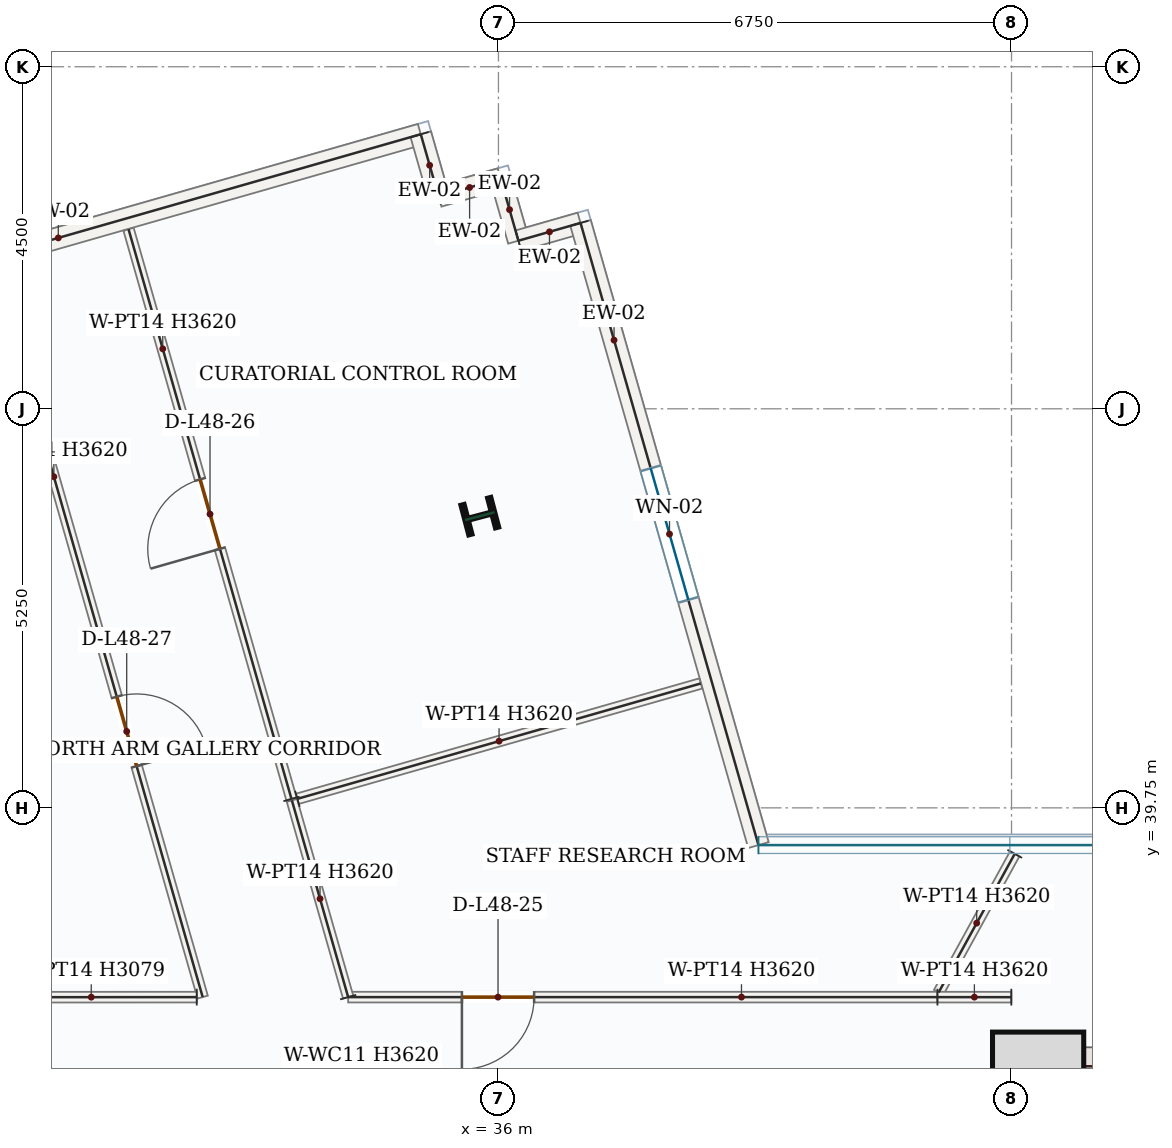
"""IFC4 building model, lengths in metres.
Left out: names, types, materials, properties, quantities, classifications, styles, units other than length and angle.
Written with IfcOpenShell. Run it as: python <this file> out.ifc"""

import sys

from ifc_helpers import new_model, si_unit, direction, frame, frame_2d, origin, origin_2d, place, context, subcontext, project, spatial, rectangle, i_section, extrude, source, transform, mapped, element, fill, save


model = new_model("IFC4")
c1 = context("Model", 3, precision=1e-05, world=origin(), true_north=direction((0.0, 1.0)))
c2 = subcontext(c1, "Body", "Model", "MODEL_VIEW")
j1 = project(units=[si_unit("LENGTHUNIT", "METRE"), si_unit("PLANEANGLEUNIT", "RADIAN")], contexts=[c1])
p1 = place(None, origin())
s1 = spatial("IfcSite", under=j1, at=p1, CompositionType="ELEMENT")
p2 = place(p1, origin())
s2 = spatial("IfcBuilding", under=s1, at=p2, CompositionType="ELEMENT")
p3 = place(p2, frame((0.0, 0.0, 205.8)))
s3 = spatial("IfcBuildingStorey", under=s2, at=p3, CompositionType="ELEMENT", Elevation=205.8)
p4 = place(p3, frame((43.0, 28.05, 0.0), z_axis=(0.0, 0.0, 1.0), x_axis=(0.0, 1.0, 0.0)))
e1 = element("IfcWall", 1, at=p4, inside=s3, PredefinedType="SHEAR", context=c2, shape_type="SweptSolid", body=[
    extrude(rectangle(XDim=8.55, YDim=0.5, at=frame_2d((4.275, 0.0))), origin(), (0.0, 0.0, 1.0), 3.62),
])
p5 = place(p4, frame((1.5, 0.0, 0.0)))
e2 = element("IfcOpeningElement", 2, at=p5, cuts=e1, PredefinedType="OPENING", context=c2, shape_type="SweptSolid", body=[
    extrude(rectangle(XDim=1.1, YDim=2.2, at=frame_2d((0.55, 1.1))), frame((0.0, 0.26, 0.0), z_axis=(0.0, -1.0, 0.0), x_axis=(1.0, 0.0, 0.0)), (0.0, 0.0, 1.0), 0.52),
])
m1 = source(origin(), c2, "Body", "SweptSolid", [
    extrude(rectangle(XDim=7.0, YDim=0.5, at=frame_2d((3.5, 0.0))), origin(), (0.0, 0.0, 1.0), 3.62),
])
p6 = place(p3, frame((43.25, 36.35, 0.0), z_axis=(0.0, 0.0, 1.0), x_axis=(1.0, 0.0, 0.0)))
e3 = element("IfcWall", 3, at=p6, inside=s3, PredefinedType="SHEAR", context=c2, shape_type="MappedRepresentation", body=[
    mapped(m1, transform((0.0, 0.0, 0.0), x_axis=(1.0, 0.0, 0.0), y_axis=(0.0, 1.0, 0.0), z_axis=(0.0, 0.0, 1.0), scale=1.0)),
])
m2 = source(origin(), c2, "Body", "SweptSolid", [
    extrude(rectangle(XDim=1.2, YDim=1.2, at=origin_2d()), origin(), (0.0, 0.0, 1.0), 3.9),
])
p7 = place(p3, frame((43.1, 36.2, 0.0), z_axis=(0.0, 0.0, 1.0), x_axis=(1.0, 0.0, 0.0)))
e4 = element("IfcColumn", 4, at=p7, inside=s3, PredefinedType="COLUMN", context=c2, shape_type="MappedRepresentation", body=[
    mapped(m2, transform((0.0, 0.0, 0.0), x_axis=(1.0, 0.0, 0.0), y_axis=(0.0, 1.0, 0.0), z_axis=(0.0, 0.0, 1.0), scale=1.0)),
])
m3 = source(origin(), c2, "Body", "SweptSolid", [
    extrude(i_section(OverallWidth=0.404, OverallDepth=0.407, WebThickness=0.027, FlangeThickness=0.044, FilletRadius=0.018, at=origin_2d()), origin(), (0.0, 0.0, 1.0), 3.9),
])
p8 = place(p3, frame((35.755, 43.588, 0.0), z_axis=(0.0, 0.0, 1.0), x_axis=(-0.255445757936, 0.966823388604, 0.0)))
e5 = element("IfcColumn", 5, at=p8, inside=s3, PredefinedType="COLUMN", context=c2, shape_type="MappedRepresentation", body=[
    mapped(m3, transform((0.0, 0.0, 0.0), x_axis=(1.0, 0.0, 0.0), y_axis=(0.0, 1.0, 0.0), z_axis=(0.0, 0.0, 1.0), scale=1.0)),
])
m4 = source(origin(), c2, "Body", "SweptSolid", [
    extrude(rectangle(XDim=9.92, YDim=0.28, at=frame_2d((4.96, 0.0))), origin(), (0.0, 0.0, 1.0), 3.62),
])
p9 = place(p3, frame((25.44, 45.885, 0.0), z_axis=(0.0, 0.0, 1.0), x_axis=(0.961457051276, 0.274955157346, 0.0)))
e6 = element("IfcWall", 6, at=p9, inside=s3, PredefinedType="SOLIDWALL", context=c2, shape_type="MappedRepresentation", body=[
    mapped(m4, transform((0.0, 0.0, 0.0), x_axis=(1.0, 0.0, 0.0), y_axis=(0.0, 1.0, 0.0), z_axis=(0.0, 0.0, 1.0), scale=1.0)),
])
m5 = source(origin(), c2, "Body", "SweptSolid", [
    extrude(rectangle(XDim=0.85, YDim=0.28, at=frame_2d((0.425, 0.0))), origin(), (0.0, 0.0, 1.0), 3.62),
])
for number, where, z_axis, x_axis in (
    (7, (34.978, 48.612, 0.0), (0.0, 0.0, 1.0), (0.275, -0.961, 0.0)),
    (8, (35.212, 47.795, 0.0), (0.0, 0.0, 1.0), (0.961, 0.275, 0.0)),
):
    element("IfcWall", number, at=place(p3, frame(where, z_axis=z_axis, x_axis=x_axis)), inside=s3, PredefinedType="SOLIDWALL", context=c2, shape_type="MappedRepresentation", body=[
        mapped(m5, transform((0.0, 0.0, 0.0), x_axis=(1.0, 0.0, 0.0), y_axis=(0.0, 1.0, 0.0), z_axis=(0.0, 0.0, 1.0), scale=1.0)),
    ])
m6 = source(origin(), c2, "Body", "SweptSolid", [
    extrude(rectangle(XDim=0.85, YDim=0.28, at=frame_2d((0.425, 0.0))), origin(), (0.0, 0.0, 1.0), 3.62),
])
p10 = place(p3, frame((36.029, 48.029, 0.0), z_axis=(0.0, 0.0, 1.0), x_axis=(0.274834915789, -0.961491429532, 0.0)))
e9 = element("IfcWall", 9, at=p10, inside=s3, PredefinedType="SOLIDWALL", context=c2, shape_type="MappedRepresentation", body=[
    mapped(m6, transform((0.0, 0.0, 0.0), x_axis=(1.0, 0.0, 0.0), y_axis=(0.0, 1.0, 0.0), z_axis=(0.0, 0.0, 1.0), scale=1.0)),
])
p11 = place(p3, frame((36.263, 47.211, 0.0), z_axis=(0.0, 0.0, 1.0), x_axis=(0.961393768724, 0.275176346112, 0.0)))
e10 = element("IfcWall", 10, at=p11, inside=s3, PredefinedType="SOLIDWALL", context=c2, shape_type="MappedRepresentation", body=[
    mapped(m5, transform((0.0, 0.0, 0.0), x_axis=(1.0, 0.0, 0.0), y_axis=(0.0, 1.0, 0.0), z_axis=(0.0, 0.0, 1.0), scale=1.0)),
])
p12 = place(p3, frame((37.08, 47.445, 0.0), z_axis=(0.0, 0.0, 1.0), x_axis=(0.27496352843, -0.961454657295, 0.0)))
e11 = element("IfcWall", 11, at=p12, inside=s3, PredefinedType="SOLIDWALL", context=c2, shape_type="SweptSolid", body=[
    extrude(rectangle(XDim=8.513, YDim=0.28, at=frame_2d((4.257, 0.0))), origin(), (0.0, 0.0, 1.0), 3.62),
])
p13 = place(p12, frame((3.357, 0.0, 0.85)))
e12 = element("IfcOpeningElement", 12, at=p13, cuts=e11, PredefinedType="OPENING", context=c2, shape_type="SweptSolid", body=[
    extrude(rectangle(XDim=1.8, YDim=1.75, at=frame_2d((0.9, 0.875))), frame((0.0, 0.15, 0.0), z_axis=(0.0, -1.0, 0.0), x_axis=(1.0, 0.0, 0.0)), (0.0, 0.0, 1.0), 0.3),
])
p14 = place(p3, frame((41.775, 37.26, 0.0), z_axis=(0.0, 0.0, 1.0), x_axis=(-1.0, 0.0, 0.0)))
e13 = element("IfcWall", 13, at=p14, inside=s3, PredefinedType="PARTITIONING", context=c2, shape_type="SweptSolid", body=[
    extrude(rectangle(XDim=7.753, YDim=0.14, at=frame_2d((3.876, 0.0))), origin(), (0.0, 0.0, 1.0), 3.62),
])
p15 = place(p14, frame((5.306, 0.0, 0.0)))
e14 = element("IfcOpeningElement", 14, at=p15, cuts=e13, PredefinedType="OPENING", context=c2, shape_type="SweptSolid", body=[
    extrude(rectangle(XDim=0.95, YDim=2.15, at=frame_2d((0.475, 1.075))), frame((0.0, 0.08, 0.0), z_axis=(0.0, -1.0, 0.0), x_axis=(1.0, 0.0, 0.0)), (0.0, 0.0, 1.0), 0.16),
])
m7 = source(origin(), c2, "Body", "SweptSolid", [
    extrude(rectangle(XDim=2.692, YDim=0.14, at=frame_2d((1.346, 0.0))), origin(), (0.0, 0.0, 1.0), 3.62),
])
p16 = place(p3, frame((34.023, 37.26, 0.0), z_axis=(0.0, 0.0, 1.0), x_axis=(-0.27500862401, 0.961441759401, 0.0)))
e15 = element("IfcWall", 15, at=p16, inside=s3, PredefinedType="PARTITIONING", context=c2, shape_type="MappedRepresentation", body=[
    mapped(m7, transform((0.0, 0.0, 0.0), x_axis=(1.0, 0.0, 0.0), y_axis=(0.0, 1.0, 0.0), z_axis=(0.0, 0.0, 1.0), scale=1.0)),
])
m8 = source(origin(), c2, "Body", "SweptSolid", [
    extrude(rectangle(XDim=5.52, YDim=0.14, at=frame_2d((2.76, 0.0))), origin(), (0.0, 0.0, 1.0), 3.62),
])
p17 = place(p3, frame((33.354, 39.869, 0.0), z_axis=(0.0, 0.0, 1.0), x_axis=(0.961455490798, 0.274960613933, 0.0)))
e16 = element("IfcWall", 16, at=p17, inside=s3, PredefinedType="PARTITIONING", context=c2, shape_type="MappedRepresentation", body=[
    mapped(m8, transform((0.0, 0.0, 0.0), x_axis=(1.0, 0.0, 0.0), y_axis=(0.0, 1.0, 0.0), z_axis=(0.0, 0.0, 1.0), scale=1.0)),
])
m9 = source(origin(), c2, "Body", "SweptSolid", [
    extrude(rectangle(XDim=2.08, YDim=0.14, at=frame_2d((1.04, 0.0))), origin(), (0.0, 0.0, 1.0), 3.62),
])
p18 = place(p3, frame((42.792, 39.145, 0.0), z_axis=(0.0, 0.0, 1.0), x_axis=(-0.481301259497, -0.87655524504, 0.0)))
e17 = element("IfcWall", 17, at=p18, inside=s3, PredefinedType="PARTITIONING", context=c2, shape_type="MappedRepresentation", body=[
    mapped(m9, transform((0.0, 0.0, 0.0), x_axis=(1.0, 0.0, 0.0), y_axis=(0.0, 1.0, 0.0), z_axis=(0.0, 0.0, 1.0), scale=1.0)),
])
p19 = place(p3, frame((33.277, 39.867, 0.0), z_axis=(0.0, 0.0, 1.0), x_axis=(-0.274985856522, 0.96144827147, 0.0)))
e18 = element("IfcWall", 18, at=p19, inside=s3, PredefinedType="PARTITIONING", context=c2, shape_type="SweptSolid", body=[
    extrude(rectangle(XDim=7.795, YDim=0.14, at=frame_2d((3.897, 0.0))), origin(), (0.0, 0.0, 1.0), 3.62),
])
p20 = place(p19, frame((3.423, 0.0, 0.0)))
e19 = element("IfcOpeningElement", 19, at=p20, cuts=e18, PredefinedType="OPENING", context=c2, shape_type="SweptSolid", body=[
    extrude(rectangle(XDim=0.95, YDim=2.15, at=frame_2d((0.475, 1.075))), frame((0.0, 0.08, 0.0), z_axis=(0.0, -1.0, 0.0), x_axis=(1.0, 0.0, 0.0)), (0.0, 0.0, 1.0), 0.16),
])
m10 = source(origin(), c2, "Body", "SweptSolid", [
    extrude(rectangle(XDim=0.972, YDim=0.14, at=frame_2d((0.486, 0.0))), origin(), (0.0, 0.0, 1.0), 3.62),
])
p21 = place(p3, frame((42.748, 37.259, 0.0), z_axis=(0.0, 0.0, 1.0), x_axis=(-0.999999716202, 0.000753390042, 0.0)))
e20 = element("IfcWall", 20, at=p21, inside=s3, PredefinedType="PARTITIONING", context=c2, shape_type="MappedRepresentation", body=[
    mapped(m10, transform((0.0, 0.0, 0.0), x_axis=(1.0, 0.0, 0.0), y_axis=(0.0, 1.0, 0.0), z_axis=(0.0, 0.0, 1.0), scale=1.0)),
])
p22 = place(p3, frame((29.365, 46.856, 0.0), z_axis=(0.0, 0.0, 1.0), x_axis=(0.274969885882, -0.961452839123, 0.0)))
e21 = element("IfcWall", 21, at=p22, inside=s3, PredefinedType="PARTITIONING", context=c2, shape_type="SweptSolid", body=[
    extrude(rectangle(XDim=9.981, YDim=0.14, at=frame_2d((4.99, 0.0))), origin(), (0.0, 0.0, 1.0), 3.62),
])
p23 = place(p22, frame((5.87, 0.0, 0.0)))
e22 = element("IfcOpeningElement", 22, at=p23, cuts=e21, PredefinedType="OPENING", context=c2, shape_type="SweptSolid", body=[
    extrude(rectangle(XDim=0.95, YDim=2.15, at=frame_2d((0.475, 1.075))), frame((0.0, 0.08, 0.0), z_axis=(0.0, -1.0, 0.0), x_axis=(1.0, 0.0, 0.0)), (0.0, 0.0, 1.0), 0.16),
])
m11 = source(origin(), c2, "Body", "SweptSolid", [
    extrude(rectangle(XDim=2.776, YDim=0.14, at=frame_2d((1.388, 0.0))), origin(), (0.0, 0.0, 1.0), 3.079),
])
p24 = place(p3, frame((32.031, 37.26, 0.0), z_axis=(0.0, 0.0, 1.0), x_axis=(-0.999999903325, -0.000439715022, 0.0)))
e23 = element("IfcWall", 23, at=p24, inside=s3, PredefinedType="PARTITIONING", context=c2, shape_type="MappedRepresentation", body=[
    mapped(m11, transform((0.0, 0.0, 0.0), x_axis=(1.0, 0.0, 0.0), y_axis=(0.0, 1.0, 0.0), z_axis=(0.0, 0.0, 1.0), scale=1.0)),
])
m12 = source(origin(), c2, "Body", "SweptSolid", [
    extrude(rectangle(XDim=1.8, YDim=1.75, at=frame_2d((0.9, 0.875))), frame((0.0, 0.03, 0.0), z_axis=(0.0, -1.0, 0.0), x_axis=(1.0, 0.0, 0.0)), (0.0, 0.0, 1.0), 0.06),
])
p25 = place(p13, origin())
e24 = element("IfcWindow", 24, at=p25, inside=s3, PartitioningType="DOUBLE_PANEL_VERTICAL", PredefinedType="WINDOW", context=c2, shape_type="MappedRepresentation", body=[
    mapped(m12, transform((0.0, 0.0, 0.0), x_axis=(1.0, 0.0, 0.0), y_axis=(0.0, 1.0, 0.0), z_axis=(0.0, 0.0, 1.0), scale=1.0)),
])
fill(e12, e24)
m13 = source(origin(), c2, "Body", "SweptSolid", [
    extrude(rectangle(XDim=0.95, YDim=2.15, at=frame_2d((0.475, 1.075))), frame((0.0, 0.025, 0.0), z_axis=(0.0, -1.0, 0.0), x_axis=(1.0, 0.0, 0.0)), (0.0, 0.0, 1.0), 0.05),
])
p26 = place(p15, origin())
e25 = element("IfcDoor", 25, at=p26, inside=s3, OperationType="SINGLE_SWING_RIGHT", PredefinedType="DOOR", context=c2, shape_type="MappedRepresentation", body=[
    mapped(m13, transform((0.0, 0.0, 0.0), x_axis=(1.0, 0.0, 0.0), y_axis=(0.0, 1.0, 0.0), z_axis=(0.0, 0.0, 1.0), scale=1.0)),
])
fill(e14, e25)
p27 = place(p20, origin())
e26 = element("IfcDoor", 26, at=p27, inside=s3, OperationType="SINGLE_SWING_LEFT", PredefinedType="DOOR", context=c2, shape_type="MappedRepresentation", body=[
    mapped(m13, transform((0.0, 0.0, 0.0), x_axis=(1.0, 0.0, 0.0), y_axis=(0.0, 1.0, 0.0), z_axis=(0.0, 0.0, 1.0), scale=1.0)),
])
fill(e19, e26)
p28 = place(p23, origin())
e27 = element("IfcDoor", 27, at=p28, inside=s3, OperationType="SINGLE_SWING_RIGHT", PredefinedType="DOOR", context=c2, shape_type="MappedRepresentation", body=[
    mapped(m13, transform((0.0, 0.0, 0.0), x_axis=(1.0, 0.0, 0.0), y_axis=(0.0, 1.0, 0.0), z_axis=(0.0, 0.0, 1.0), scale=1.0)),
])
fill(e22, e27)
save(model, sys.argv[1])
